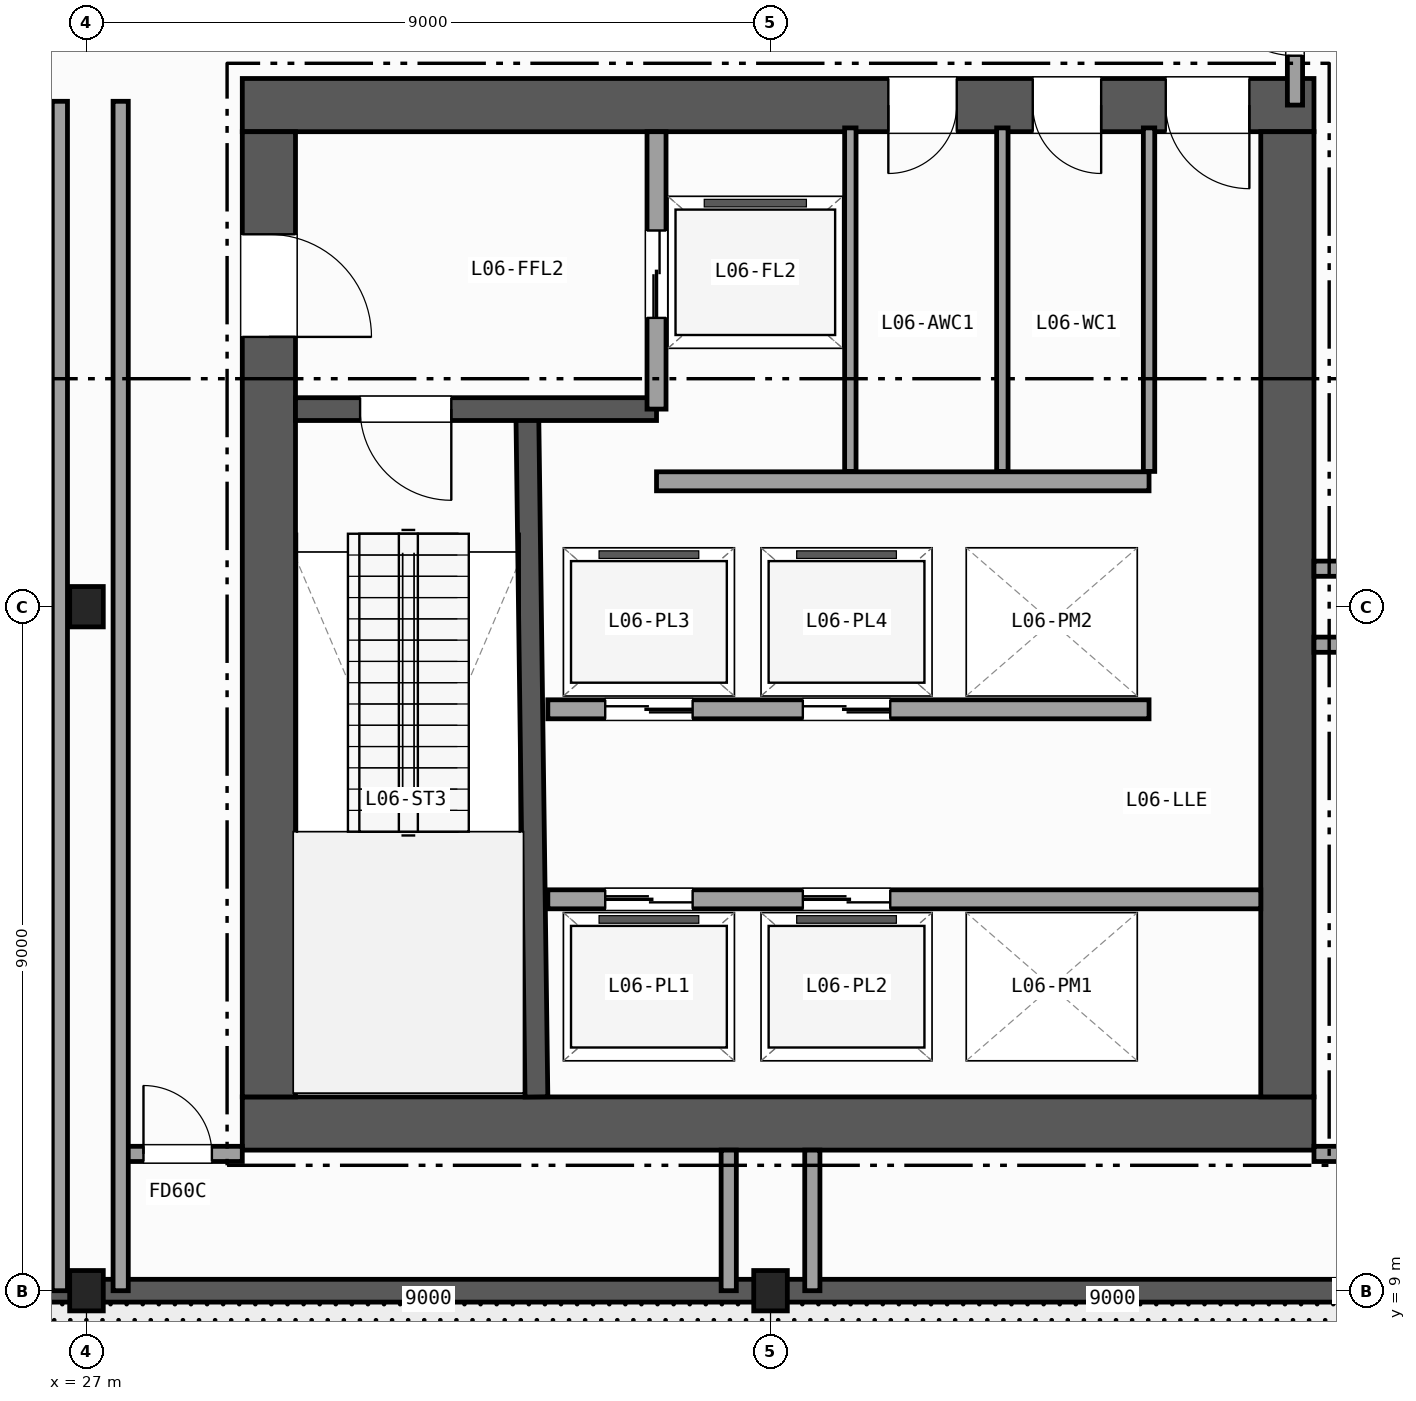
"""IFC4 building model, lengths in metres.
Left out: names, types, materials, properties, quantities, classifications, styles, units other than length and angle.
Written with IfcOpenShell. Run it as: python <this file> out.ifc"""

import sys

from ifc_helpers import new_model, si_unit, direction, frame, frame_2d, origin, origin_2d, place, context, subcontext, project, spatial, rectangle, i_section, extrude, element, fill, save


model = new_model("IFC4")
c1 = context("Model", 3, precision=1e-05, world=origin(), true_north=direction((0.0, 1.0)))
c2 = subcontext(c1, "Body", "Model", "MODEL_VIEW")
j1 = project(units=[si_unit("LENGTHUNIT", "METRE"), si_unit("PLANEANGLEUNIT", "RADIAN")], contexts=[c1])
p1 = place(None, origin())
s1 = spatial("IfcSite", under=j1, at=p1, CompositionType="ELEMENT")
p2 = place(p1, origin())
s2 = spatial("IfcBuilding", under=s1, at=p2, CompositionType="ELEMENT")
p3 = place(p2, frame((0.0, 0.0, 30.8)))
s3 = spatial("IfcBuildingStorey", under=s2, at=p3, CompositionType="ELEMENT", Elevation=30.8)
p4 = place(p3, frame((27.0, 9.0, 0.0), z_axis=(0.0, 0.0, 1.0), x_axis=(1.0, 0.0, 0.0)))
e1 = element("IfcColumn", 1, at=p4, inside=s3, PredefinedType="COLUMN", context=c2, shape_type="SweptSolid", body=[
    extrude(i_section(OverallWidth=0.442, OverallDepth=0.531, WebThickness=0.066, FlangeThickness=0.106, FilletRadius=0.015, at=origin_2d()), origin(), (0.0, 0.0, 1.0), 5.2),
])
p5 = place(p3, frame((27.0, 18.0, -0.36), z_axis=(0.0, 0.0, 1.0), x_axis=(1.0, 0.0, 0.0)))
e2 = element("IfcColumn", 2, at=p5, inside=s3, PredefinedType="COLUMN", context=c2, shape_type="SweptSolid", body=[
    extrude(i_section(OverallWidth=0.442, OverallDepth=0.531, WebThickness=0.066, FlangeThickness=0.106, FilletRadius=0.015, at=origin_2d()), origin(), (0.0, 0.0, 1.0), 5.56),
])
p6 = place(p3, frame((36.0, 9.0, 0.0), z_axis=(0.0, 0.0, 1.0), x_axis=(1.0, 0.0, 0.0)))
e3 = element("IfcColumn", 3, at=p6, inside=s3, PredefinedType="COLUMN", context=c2, shape_type="SweptSolid", body=[
    extrude(i_section(OverallWidth=0.442, OverallDepth=0.531, WebThickness=0.066, FlangeThickness=0.106, FilletRadius=0.015, at=origin_2d()), origin(), (0.0, 0.0, 1.0), 5.2),
])
p7 = place(p3, frame((60.93, 9.0, 0.0), z_axis=(0.0, 0.0, 1.0), x_axis=(-1.0, 0.0, 0.0)))
e4 = element("IfcWall", 4, at=p7, inside=s3, PredefinedType="SOLIDWALL", context=c2, shape_type="SweptSolid", body=[
    extrude(rectangle(XDim=37.13, YDim=0.3, at=frame_2d((18.565, 0.0))), origin(), (0.0, 0.0, 1.0), 4.92),
])
p8 = place(p7, frame((34.68, 0.0, 0.0)))
e5 = element("IfcOpeningElement", 5, at=p8, cuts=e4, PredefinedType="OPENING", context=c2, shape_type="SweptSolid", body=[
    extrude(rectangle(XDim=1.4, YDim=2.25, at=frame_2d((0.7, 1.125))), frame((0.0, 0.16, 0.0), z_axis=(0.0, -1.0, 0.0), x_axis=(1.0, 0.0, 0.0)), (0.0, 0.0, 1.0), 0.32),
])
p9 = place(p3, frame((29.05, 11.2, 0.0), z_axis=(0.0, 0.0, 1.0), x_axis=(1.0, 0.0, 0.0)))
e6 = element("IfcWall", 6, at=p9, inside=s3, PredefinedType="SHEAR", context=c2, shape_type="SweptSolid", body=[
    extrude(rectangle(XDim=14.1, YDim=0.7, at=frame_2d((7.05, 0.0))), origin(), (0.0, 0.0, 1.0), 4.92),
])
p10 = place(p3, frame((43.15, 24.6, 0.0), z_axis=(0.0, 0.0, 1.0), x_axis=(-1.0, 0.0, 0.0)))
e7 = element("IfcWall", 7, at=p10, inside=s3, PredefinedType="SHEAR", context=c2, shape_type="SweptSolid", body=[
    extrude(rectangle(XDim=14.1, YDim=0.7, at=frame_2d((7.05, 0.0))), origin(), (0.0, 0.0, 1.0), 4.92),
])
p11 = place(p10, frame((0.85, 0.0, 0.0)))
e8 = element("IfcOpeningElement", 8, at=p11, cuts=e7, PredefinedType="OPENING", context=c2, shape_type="SweptSolid", body=[
    extrude(rectangle(XDim=1.1, YDim=2.15, at=frame_2d((0.55, 1.075))), frame((0.0, 0.36, 0.0), z_axis=(0.0, -1.0, 0.0), x_axis=(1.0, 0.0, 0.0)), (0.0, 0.0, 1.0), 0.72),
])
p12 = place(p10, frame((2.8, 0.0, 0.0)))
e9 = element("IfcOpeningElement", 9, at=p12, cuts=e7, PredefinedType="OPENING", context=c2, shape_type="SweptSolid", body=[
    extrude(rectangle(XDim=0.9, YDim=2.1, at=frame_2d((0.45, 1.05))), frame((0.0, 0.36, 0.0), z_axis=(0.0, -1.0, 0.0), x_axis=(1.0, 0.0, 0.0)), (0.0, 0.0, 1.0), 0.72),
])
p13 = place(p10, frame((4.7, 0.0, 0.0)))
e10 = element("IfcOpeningElement", 10, at=p13, cuts=e7, PredefinedType="OPENING", context=c2, shape_type="SweptSolid", body=[
    extrude(rectangle(XDim=0.9, YDim=2.1, at=frame_2d((0.45, 1.05))), frame((0.0, 0.36, 0.0), z_axis=(0.0, -1.0, 0.0), x_axis=(1.0, 0.0, 0.0)), (0.0, 0.0, 1.0), 0.72),
])
p14 = place(p3, frame((29.4, 24.25, 0.0), z_axis=(0.0, 0.0, 1.0), x_axis=(0.0, -1.0, 0.0)))
e11 = element("IfcWall", 11, at=p14, inside=s3, PredefinedType="SHEAR", context=c2, shape_type="SweptSolid", body=[
    extrude(rectangle(XDim=12.7, YDim=0.7, at=frame_2d((6.35, 0.0))), origin(), (0.0, 0.0, 1.0), 4.92),
])
p15 = place(p14, frame((1.35, 0.0, 0.0)))
e12 = element("IfcOpeningElement", 12, at=p15, cuts=e11, PredefinedType="OPENING", context=c2, shape_type="SweptSolid", body=[
    extrude(rectangle(XDim=1.35, YDim=2.15, at=frame_2d((0.675, 1.075))), frame((0.0, 0.36, 0.0), z_axis=(0.0, -1.0, 0.0), x_axis=(1.0, 0.0, 0.0)), (0.0, 0.0, 1.0), 0.72),
])
p16 = place(p3, frame((42.8, 11.55, 0.0), z_axis=(0.0, 0.0, 1.0), x_axis=(0.0, 1.0, 0.0)))
e13 = element("IfcWall", 13, at=p16, inside=s3, PredefinedType="SHEAR", context=c2, shape_type="SweptSolid", body=[
    extrude(rectangle(XDim=12.7, YDim=0.7, at=frame_2d((6.35, 0.0))), origin(), (0.0, 0.0, 1.0), 4.92),
])
p17 = place(p3, frame((32.92, 11.55, 0.0), z_axis=(0.0, 0.0, 1.0), x_axis=(-0.01331804616, 0.99991131089, 0.0)))
e14 = element("IfcWall", 14, at=p17, inside=s3, PredefinedType="SHEAR", context=c2, shape_type="SweptSolid", body=[
    extrude(rectangle(XDim=9.001, YDim=0.3, at=frame_2d((4.5, 0.0))), origin(), (0.0, 0.0, 1.0), 4.92),
])
p18 = place(p3, frame((34.5, 20.6, 0.0), z_axis=(0.0, 0.0, 1.0), x_axis=(-1.0, 0.0, 0.0)))
e15 = element("IfcWall", 15, at=p18, inside=s3, PredefinedType="SHEAR", context=c2, shape_type="SweptSolid", body=[
    extrude(rectangle(XDim=4.75, YDim=0.3, at=frame_2d((2.375, 0.0))), origin(), (0.0, 0.0, 1.0), 4.92),
])
p19 = place(p18, frame((2.7, 0.0, 0.0)))
e16 = element("IfcOpeningElement", 16, at=p19, cuts=e15, PredefinedType="OPENING", context=c2, shape_type="SweptSolid", body=[
    extrude(rectangle(XDim=1.2, YDim=2.15, at=frame_2d((0.6, 1.075))), frame((0.0, 0.16, 0.0), z_axis=(0.0, -1.0, 0.0), x_axis=(1.0, 0.0, 0.0)), (0.0, 0.0, 1.0), 0.32),
])
p20 = place(p3, frame((34.5, 20.6, 0.0), z_axis=(0.0, 0.0, 1.0), x_axis=(0.0, 1.0, 0.0)))
e17 = element("IfcWall", 17, at=p20, inside=s3, PredefinedType="PARTITIONING", context=c2, shape_type="SweptSolid", body=[
    extrude(rectangle(XDim=3.65, YDim=0.25, at=frame_2d((1.825, 0.0))), origin(), (0.0, 0.0, 1.0), 4.92),
])
p21 = place(p20, frame((1.2, 0.0, 0.0)))
e18 = element("IfcOpeningElement", 18, at=p21, cuts=e17, PredefinedType="OPENING", context=c2, shape_type="SweptSolid", body=[
    extrude(rectangle(XDim=1.15, YDim=2.15, at=frame_2d((0.575, 1.075))), frame((0.0, 0.135, 0.0), z_axis=(0.0, -1.0, 0.0), x_axis=(1.0, 0.0, 0.0)), (0.0, 0.0, 1.0), 0.27),
])
p22 = place(p3, frame((34.5, 19.65, 0.0), z_axis=(0.0, 0.0, 1.0), x_axis=(1.0, 0.0, 0.0)))
e19 = element("IfcWall", 19, at=p22, inside=s3, PredefinedType="PARTITIONING", context=c2, shape_type="SweptSolid", body=[
    extrude(rectangle(XDim=6.48, YDim=0.25, at=frame_2d((3.24, 0.0))), origin(), (0.0, 0.0, 1.0), 4.92),
])
p23 = place(p3, frame((33.07, 14.15, 0.0), z_axis=(0.0, 0.0, 1.0), x_axis=(1.0, 0.0, 0.0)))
e20 = element("IfcWall", 20, at=p23, inside=s3, PredefinedType="PARTITIONING", context=c2, shape_type="SweptSolid", body=[
    extrude(rectangle(XDim=9.38, YDim=0.25, at=frame_2d((4.69, 0.0))), origin(), (0.0, 0.0, 1.0), 4.92),
])
p24 = place(p23, frame((0.755, 0.0, 0.0)))
e21 = element("IfcOpeningElement", 21, at=p24, cuts=e20, PredefinedType="OPENING", context=c2, shape_type="SweptSolid", body=[
    extrude(rectangle(XDim=1.15, YDim=2.15, at=frame_2d((0.575, 1.075))), frame((0.0, 0.135, 0.0), z_axis=(0.0, -1.0, 0.0), x_axis=(1.0, 0.0, 0.0)), (0.0, 0.0, 1.0), 0.27),
])
p25 = place(p23, frame((3.355, 0.0, 0.0)))
e22 = element("IfcOpeningElement", 22, at=p25, cuts=e20, PredefinedType="OPENING", context=c2, shape_type="SweptSolid", body=[
    extrude(rectangle(XDim=1.15, YDim=2.15, at=frame_2d((0.575, 1.075))), frame((0.0, 0.135, 0.0), z_axis=(0.0, -1.0, 0.0), x_axis=(1.0, 0.0, 0.0)), (0.0, 0.0, 1.0), 0.27),
])
p26 = place(p3, frame((40.98, 16.65, 0.0), z_axis=(0.0, 0.0, 1.0), x_axis=(-1.0, 0.0, 0.0)))
e23 = element("IfcWall", 23, at=p26, inside=s3, PredefinedType="PARTITIONING", context=c2, shape_type="SweptSolid", body=[
    extrude(rectangle(XDim=7.91, YDim=0.25, at=frame_2d((3.955, 0.0))), origin(), (0.0, 0.0, 1.0), 4.92),
])
p27 = place(p26, frame((6.005, 0.0, 0.0)))
e24 = element("IfcOpeningElement", 24, at=p27, cuts=e23, PredefinedType="OPENING", context=c2, shape_type="SweptSolid", body=[
    extrude(rectangle(XDim=1.15, YDim=2.15, at=frame_2d((0.575, 1.075))), frame((0.0, 0.135, 0.0), z_axis=(0.0, -1.0, 0.0), x_axis=(1.0, 0.0, 0.0)), (0.0, 0.0, 1.0), 0.27),
])
p28 = place(p26, frame((3.405, 0.0, 0.0)))
e25 = element("IfcOpeningElement", 25, at=p28, cuts=e23, PredefinedType="OPENING", context=c2, shape_type="SweptSolid", body=[
    extrude(rectangle(XDim=1.15, YDim=2.15, at=frame_2d((0.575, 1.075))), frame((0.0, 0.135, 0.0), z_axis=(0.0, -1.0, 0.0), x_axis=(1.0, 0.0, 0.0)), (0.0, 0.0, 1.0), 0.27),
])
for number, where, z_axis, x_axis in (
    (26, (37.05, 19.78, 0.0), (0.0, 0.0, 1.0), (0.0, 1.0, 0.0)),
    (27, (39.05, 19.78, 0.0), (0.0, 0.0, 1.0), (0.0, 1.0, 0.0)),
    (28, (40.98, 19.78, 0.0), (0.0, 0.0, 1.0), (0.0, 1.0, 0.0)),
):
    element("IfcWall", number, at=place(p3, frame(where, z_axis=z_axis, x_axis=x_axis)), inside=s3, PredefinedType="PARTITIONING", context=c2, shape_type="SweptSolid", body=[
        extrude(rectangle(XDim=4.52, YDim=0.15, at=frame_2d((2.26, 0.0))), origin(), (0.0, 0.0, 1.0), 4.92),
    ])
p29 = place(p3, frame((27.45, 10.8, 0.0), z_axis=(0.0, 0.0, 1.0), x_axis=(1.0, 0.0, 0.0)))
e29 = element("IfcWall", 29, at=p29, inside=s3, PredefinedType="PARTITIONING", context=c2, shape_type="SweptSolid", body=[
    extrude(rectangle(XDim=1.6, YDim=0.2, at=frame_2d((0.8, 0.0))), origin(), (0.0, 0.0, 1.0), 4.92),
])
p30 = place(p29, frame((0.3, 0.0, 0.0)))
e30 = element("IfcOpeningElement", 30, at=p30, cuts=e29, PredefinedType="OPENING", context=c2, shape_type="SweptSolid", body=[
    extrude(rectangle(XDim=0.9, YDim=2.1, at=frame_2d((0.45, 1.05))), frame((0.0, 0.11, 0.0), z_axis=(0.0, -1.0, 0.0), x_axis=(1.0, 0.0, 0.0)), (0.0, 0.0, 1.0), 0.22),
])
p31 = place(p3, frame((43.15, 10.8, 0.0), z_axis=(0.0, 0.0, 1.0), x_axis=(1.0, 0.0, 0.0)))
e31 = element("IfcWall", 31, at=p31, inside=s3, PredefinedType="PARTITIONING", context=c2, shape_type="SweptSolid", body=[
    extrude(rectangle(XDim=19.85, YDim=0.2, at=frame_2d((9.925, 0.0))), origin(), (0.0, 0.0, 1.0), 4.045),
])
p32 = place(p31, frame((0.6, 0.0, 0.0)))
e32 = element("IfcOpeningElement", 32, at=p32, cuts=e31, PredefinedType="OPENING", context=c2, shape_type="SweptSolid", body=[
    extrude(rectangle(XDim=0.9, YDim=2.1, at=frame_2d((0.45, 1.05))), frame((0.0, 0.11, 0.0), z_axis=(0.0, -1.0, 0.0), x_axis=(1.0, 0.0, 0.0)), (0.0, 0.0, 1.0), 0.22),
])
p33 = place(p31, frame((4.5, 0.0, 0.0)))
e33 = element("IfcOpeningElement", 33, at=p33, cuts=e31, PredefinedType="OPENING", context=c2, shape_type="SweptSolid", body=[
    extrude(rectangle(XDim=1.0, YDim=2.15, at=frame_2d((0.5, 1.075))), frame((0.0, 0.11, 0.0), z_axis=(0.0, -1.0, 0.0), x_axis=(1.0, 0.0, 0.0)), (0.0, 0.0, 1.0), 0.22),
])
for number, where, z_axis, x_axis in (
    (34, (35.45, 9.0, 0.0), (0.0, 0.0, 1.0), (0.0, 1.0, 0.0)),
    (35, (36.55, 9.0, 0.0), (0.0, 0.0, 1.0), (0.0, 1.0, 0.0)),
):
    element("IfcWall", number, at=place(p3, frame(where, z_axis=z_axis, x_axis=x_axis)), inside=s3, PredefinedType="PARTITIONING", context=c2, shape_type="SweptSolid", body=[
        extrude(rectangle(XDim=1.85, YDim=0.2, at=frame_2d((0.925, 0.0))), origin(), (0.0, 0.0, 1.0), 4.127),
    ])
p34 = place(p3, frame((26.65, 9.0, 0.0), z_axis=(0.0, 0.0, 1.0), x_axis=(0.0, 1.0, 0.0)))
e36 = element("IfcWall", 36, at=p34, inside=s3, PredefinedType="PARTITIONING", context=c2, shape_type="SweptSolid", body=[
    extrude(rectangle(XDim=15.65, YDim=0.2, at=frame_2d((7.825, 0.0))), origin(), (0.0, 0.0, 1.0), 3.973),
])
p35 = place(p3, frame((27.45, 9.0, 0.0), z_axis=(0.0, 0.0, 1.0), x_axis=(0.0, 1.0, 0.0)))
e37 = element("IfcWall", 37, at=p35, inside=s3, PredefinedType="PARTITIONING", context=c2, shape_type="SweptSolid", body=[
    extrude(rectangle(XDim=15.65, YDim=0.2, at=frame_2d((7.825, 0.0))), origin(), (0.0, 0.0, 1.0), 4.127),
])
p36 = place(p3, frame((42.9, 24.6, 0.0), z_axis=(0.0, 0.0, 1.0), x_axis=(0.0, 1.0, 0.0)))
e38 = element("IfcWall", 38, at=p36, inside=s3, PredefinedType="PARTITIONING", context=c2, shape_type="SweptSolid", body=[
    extrude(rectangle(XDim=2.4, YDim=0.2, at=frame_2d((1.2, 0.0))), origin(), (0.0, 0.0, 1.0), 4.127),
])
p37 = place(p36, frame((0.65, 0.0, 0.0)))
e39 = element("IfcOpeningElement", 39, at=p37, cuts=e38, PredefinedType="OPENING", context=c2, shape_type="SweptSolid", body=[
    extrude(rectangle(XDim=1.1, YDim=2.15, at=frame_2d((0.55, 1.075))), frame((0.0, 0.11, 0.0), z_axis=(0.0, -1.0, 0.0), x_axis=(1.0, 0.0, 0.0)), (0.0, 0.0, 1.0), 0.22),
])
for number, where, z_axis, x_axis in (
    (40, (43.15, 18.5, 0.0), (0.0, 0.0, 1.0), (1.0, 0.0, 0.0)),
    (41, (43.15, 17.5, 0.0), (0.0, 0.0, 1.0), (1.0, 0.0, 0.0)),
):
    element("IfcWall", number, at=place(p3, frame(where, z_axis=z_axis, x_axis=x_axis)), inside=s3, PredefinedType="PARTITIONING", context=c2, shape_type="SweptSolid", body=[
        extrude(rectangle(XDim=2.05, YDim=0.2, at=frame_2d((1.025, 0.0))), origin(), (0.0, 0.0, 1.0), 4.045),
    ])
p38 = place(p19, origin())
e42 = element("IfcDoor", 42, at=p38, inside=s3, OperationType="SINGLE_SWING_LEFT", PredefinedType="DOOR", context=c2, shape_type="SweptSolid", body=[
    extrude(rectangle(XDim=1.2, YDim=2.15, at=frame_2d((0.6, 1.075))), frame((0.0, 0.025, 0.0), z_axis=(0.0, -1.0, 0.0), x_axis=(1.0, 0.0, 0.0)), (0.0, 0.0, 1.0), 0.05),
])
fill(e16, e42)
p39 = place(p15, origin())
e43 = element("IfcDoor", 43, at=p39, inside=s3, OperationType="SINGLE_SWING_RIGHT", PredefinedType="DOOR", context=c2, shape_type="SweptSolid", body=[
    extrude(rectangle(XDim=1.35, YDim=2.15, at=frame_2d((0.675, 1.075))), frame((0.0, 0.025, 0.0), z_axis=(0.0, -1.0, 0.0), x_axis=(1.0, 0.0, 0.0)), (0.0, 0.0, 1.0), 0.05),
])
fill(e12, e43)
p40 = place(p11, origin())
e44 = element("IfcDoor", 44, at=p40, inside=s3, OperationType="SINGLE_SWING_LEFT", PredefinedType="DOOR", context=c2, shape_type="SweptSolid", body=[
    extrude(rectangle(XDim=1.1, YDim=2.15, at=frame_2d((0.55, 1.075))), frame((0.0, 0.025, 0.0), z_axis=(0.0, -1.0, 0.0), x_axis=(1.0, 0.0, 0.0)), (0.0, 0.0, 1.0), 0.05),
])
fill(e8, e44)
p41 = place(p12, origin())
e45 = element("IfcDoor", 45, at=p41, inside=s3, OperationType="SINGLE_SWING_LEFT", PredefinedType="DOOR", context=c2, shape_type="SweptSolid", body=[
    extrude(rectangle(XDim=0.9, YDim=2.1, at=frame_2d((0.45, 1.05))), frame((0.0, 0.025, 0.0), z_axis=(0.0, -1.0, 0.0), x_axis=(1.0, 0.0, 0.0)), (0.0, 0.0, 1.0), 0.05),
])
fill(e9, e45)
p42 = place(p13, origin())
e46 = element("IfcDoor", 46, at=p42, inside=s3, OperationType="SINGLE_SWING_RIGHT", PredefinedType="DOOR", context=c2, shape_type="SweptSolid", body=[
    extrude(rectangle(XDim=0.9, YDim=2.1, at=frame_2d((0.45, 1.05))), frame((0.0, 0.025, 0.0), z_axis=(0.0, -1.0, 0.0), x_axis=(1.0, 0.0, 0.0)), (0.0, 0.0, 1.0), 0.05),
])
fill(e10, e46)
p43 = place(p21, origin())
e47 = element("IfcDoor", 47, at=p43, inside=s3, OperationType="DOUBLE_DOOR_SLIDING", PredefinedType="DOOR", context=c2, shape_type="SweptSolid", body=[
    extrude(rectangle(XDim=1.15, YDim=2.15, at=frame_2d((0.575, 1.075))), frame((0.0, 0.025, 0.0), z_axis=(0.0, -1.0, 0.0), x_axis=(1.0, 0.0, 0.0)), (0.0, 0.0, 1.0), 0.05),
])
fill(e18, e47)
p44 = place(p24, origin())
e48 = element("IfcDoor", 48, at=p44, inside=s3, OperationType="DOUBLE_DOOR_SLIDING", PredefinedType="DOOR", context=c2, shape_type="SweptSolid", body=[
    extrude(rectangle(XDim=1.15, YDim=2.15, at=frame_2d((0.575, 1.075))), frame((0.0, 0.025, 0.0), z_axis=(0.0, -1.0, 0.0), x_axis=(1.0, 0.0, 0.0)), (0.0, 0.0, 1.0), 0.05),
])
fill(e21, e48)
p45 = place(p25, origin())
e49 = element("IfcDoor", 49, at=p45, inside=s3, OperationType="DOUBLE_DOOR_SLIDING", PredefinedType="DOOR", context=c2, shape_type="SweptSolid", body=[
    extrude(rectangle(XDim=1.15, YDim=2.15, at=frame_2d((0.575, 1.075))), frame((0.0, 0.025, 0.0), z_axis=(0.0, -1.0, 0.0), x_axis=(1.0, 0.0, 0.0)), (0.0, 0.0, 1.0), 0.05),
])
fill(e22, e49)
p46 = place(p27, origin())
e50 = element("IfcDoor", 50, at=p46, inside=s3, OperationType="DOUBLE_DOOR_SLIDING", PredefinedType="DOOR", context=c2, shape_type="SweptSolid", body=[
    extrude(rectangle(XDim=1.15, YDim=2.15, at=frame_2d((0.575, 1.075))), frame((0.0, 0.025, 0.0), z_axis=(0.0, -1.0, 0.0), x_axis=(1.0, 0.0, 0.0)), (0.0, 0.0, 1.0), 0.05),
])
fill(e24, e50)
p47 = place(p28, origin())
e51 = element("IfcDoor", 51, at=p47, inside=s3, OperationType="DOUBLE_DOOR_SLIDING", PredefinedType="DOOR", context=c2, shape_type="SweptSolid", body=[
    extrude(rectangle(XDim=1.15, YDim=2.15, at=frame_2d((0.575, 1.075))), frame((0.0, 0.025, 0.0), z_axis=(0.0, -1.0, 0.0), x_axis=(1.0, 0.0, 0.0)), (0.0, 0.0, 1.0), 0.05),
])
fill(e25, e51)
p48 = place(p30, origin())
e52 = element("IfcDoor", 52, at=p48, inside=s3, OperationType="SINGLE_SWING_LEFT", PredefinedType="DOOR", context=c2, shape_type="SweptSolid", body=[
    extrude(rectangle(XDim=0.9, YDim=2.1, at=frame_2d((0.45, 1.05))), frame((0.0, 0.025, 0.0), z_axis=(0.0, -1.0, 0.0), x_axis=(1.0, 0.0, 0.0)), (0.0, 0.0, 1.0), 0.05),
])
fill(e30, e52)
p49 = place(p37, origin())
e53 = element("IfcDoor", 53, at=p49, inside=s3, OperationType="SINGLE_SWING_RIGHT", PredefinedType="DOOR", context=c2, shape_type="SweptSolid", body=[
    extrude(rectangle(XDim=1.1, YDim=2.15, at=frame_2d((0.55, 1.075))), frame((0.0, 0.025, 0.0), z_axis=(0.0, -1.0, 0.0), x_axis=(1.0, 0.0, 0.0)), (0.0, 0.0, 1.0), 0.05),
])
fill(e39, e53)
save(model, sys.argv[1])
